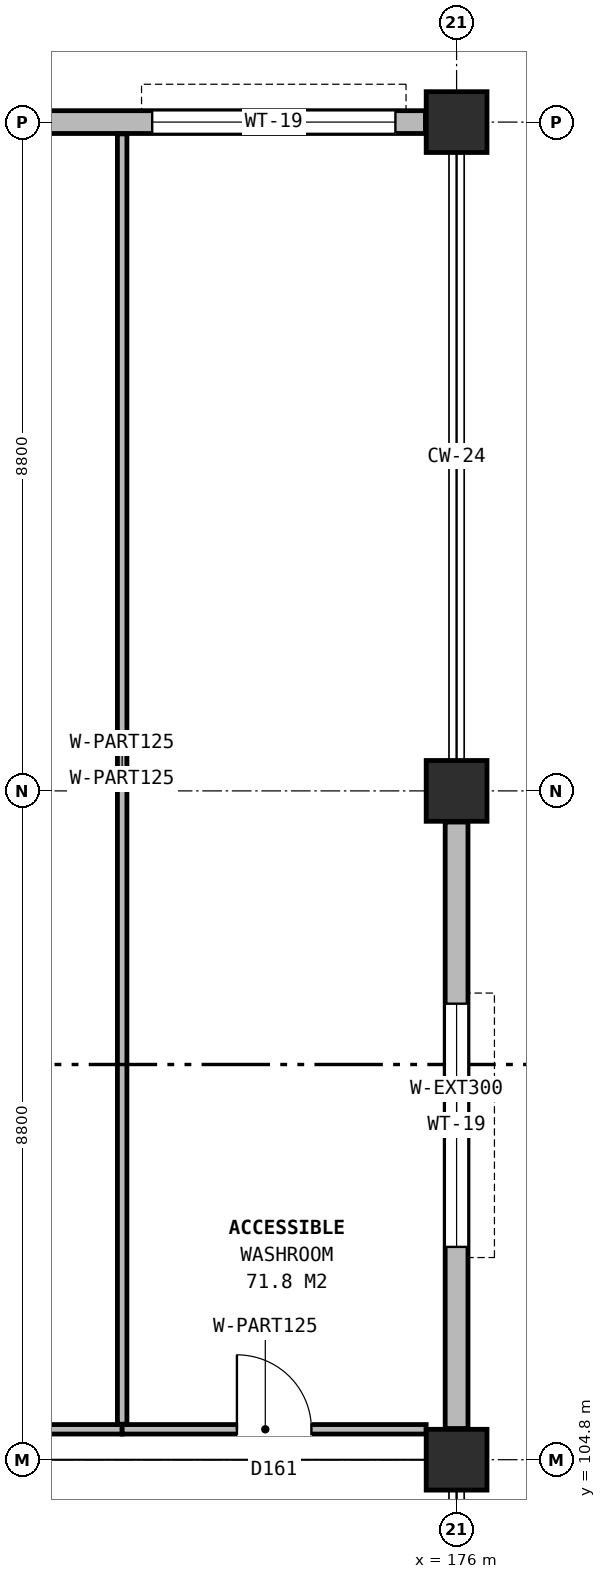
"""IFC4 building model, lengths in metres.
Left out: names, types, materials, properties, quantities, classifications, styles, units other than length and angle.
Written with IfcOpenShell. Run it as: python <this file> out.ifc"""

import sys

from ifc_helpers import new_model, si_unit, direction, frame, frame_2d, origin, origin_2d, place, context, subcontext, project, spatial, rectangle, extrude, element, fill, save


model = new_model("IFC4")
c1 = context("Model", 3, precision=1e-05, world=origin(), true_north=direction((0.0, 1.0)))
c2 = subcontext(c1, "Body", "Model", "MODEL_VIEW")
j1 = project(units=[si_unit("LENGTHUNIT", "METRE"), si_unit("PLANEANGLEUNIT", "RADIAN")], contexts=[c1])
p1 = place(None, origin())
s1 = spatial("IfcSite", under=j1, at=p1, CompositionType="ELEMENT")
p2 = place(p1, origin())
s2 = spatial("IfcBuilding", under=s1, at=p2, CompositionType="ELEMENT")
p3 = place(p2, frame((0.0, 0.0, 4.8)))
s3 = spatial("IfcBuildingStorey", under=s2, at=p3, CompositionType="ELEMENT", Elevation=4.8)
for number, where, z_axis, x_axis in (
    (1, (176.0, 104.8, 0.0), (0.0, 0.0, 1.0), (1.0, 0.0, 0.0)),
    (2, (176.0, 113.6, 0.0), (0.0, 0.0, 1.0), (1.0, 0.0, 0.0)),
    (3, (176.0, 122.4, 0.0), (0.0, 0.0, 1.0), (1.0, 0.0, 0.0)),
):
    element("IfcColumn", number, at=place(p3, frame(where, z_axis=z_axis, x_axis=x_axis)), inside=s3, PredefinedType="COLUMN", context=c2, shape_type="SweptSolid", body=[
        extrude(rectangle(XDim=0.8, YDim=0.8, at=origin_2d()), origin(), (0.0, 0.0, 1.0), 4.2),
    ])
p4 = place(p3, frame((176.0, 105.21, 0.0), z_axis=(0.0, 0.0, 1.0), x_axis=(0.0, 1.0, 0.0)))
e4 = element("IfcWall", 4, at=p4, inside=s3, PredefinedType="SOLIDWALL", context=c2, shape_type="SweptSolid", body=[
    extrude(rectangle(XDim=7.98, YDim=0.3, at=frame_2d((3.99, 0.0))), origin(), (0.0, 0.0, 1.0), 3.45),
])
p5 = place(p4, frame((2.39, 0.0, 0.9)))
e5 = element("IfcOpeningElement", 5, at=p5, cuts=e4, PredefinedType="OPENING", context=c2, shape_type="SweptSolid", body=[
    extrude(rectangle(XDim=3.2, YDim=2.1, at=frame_2d((1.6, 1.05))), frame((0.0, 0.16, 0.0), z_axis=(0.0, -1.0, 0.0), x_axis=(1.0, 0.0, 0.0)), (0.0, 0.0, 1.0), 0.32),
])
p6 = place(p3, frame((175.59, 122.4, 0.0), z_axis=(0.0, 0.0, 1.0), x_axis=(-1.0, 0.0, 0.0)))
e6 = element("IfcWall", 6, at=p6, inside=s3, PredefinedType="SOLIDWALL", context=c2, shape_type="SweptSolid", body=[
    extrude(rectangle(XDim=7.58, YDim=0.3, at=frame_2d((3.79, 0.0))), origin(), (0.0, 0.0, 1.0), 3.45),
])
p7 = place(p6, frame((0.395, 0.0, 0.9)))
e7 = element("IfcOpeningElement", 7, at=p7, cuts=e6, PredefinedType="OPENING", context=c2, shape_type="SweptSolid", body=[
    extrude(rectangle(XDim=3.2, YDim=2.1, at=frame_2d((1.6, 1.05))), frame((0.0, 0.16, 0.0), z_axis=(0.0, -1.0, 0.0), x_axis=(1.0, 0.0, 0.0)), (0.0, 0.0, 1.0), 0.32),
])
p8 = place(p3, frame((167.355, 105.2, 0.0), z_axis=(0.0, 0.0, 1.0), x_axis=(1.0, 0.0, 0.0)))
e8 = element("IfcWall", 8, at=p8, inside=s3, PredefinedType="PARTITIONING", context=c2, shape_type="SweptSolid", body=[
    extrude(rectangle(XDim=4.245, YDim=0.125, at=frame_2d((2.123, 0.0))), origin(), (0.0, 0.0, 1.0), 3.445),
])
p9 = place(p8, frame((1.633, 0.0, 0.0)))
e9 = element("IfcOpeningElement", 9, at=p9, cuts=e8, PredefinedType="OPENING", context=c2, shape_type="SweptSolid", body=[
    extrude(rectangle(XDim=0.98, YDim=2.1, at=frame_2d((0.49, 1.05))), frame((0.0, 0.073, 0.0), z_axis=(0.0, -1.0, 0.0), x_axis=(1.0, 0.0, 0.0)), (0.0, 0.0, 1.0), 0.145),
])
p10 = place(p3, frame((171.6, 105.2, 0.0), z_axis=(0.0, 0.0, 1.0), x_axis=(1.0, 0.0, 0.0)))
e10 = element("IfcWall", 10, at=p10, inside=s3, PredefinedType="PARTITIONING", context=c2, shape_type="SweptSolid", body=[
    extrude(rectangle(XDim=4.0, YDim=0.125, at=frame_2d((2.0, 0.0))), origin(), (0.0, 0.0, 1.0), 3.445),
])
p11 = place(p10, frame((1.51, 0.0, 0.0)))
e11 = element("IfcOpeningElement", 11, at=p11, cuts=e10, PredefinedType="OPENING", context=c2, shape_type="SweptSolid", body=[
    extrude(rectangle(XDim=0.98, YDim=2.1, at=frame_2d((0.49, 1.05))), frame((0.0, 0.073, 0.0), z_axis=(0.0, -1.0, 0.0), x_axis=(1.0, 0.0, 0.0)), (0.0, 0.0, 1.0), 0.145),
])
p12 = place(p3, frame((171.6, 105.268, 0.0), z_axis=(0.0, 0.0, 1.0), x_axis=(0.0, 1.0, 0.0)))
e12 = element("IfcWall", 12, at=p12, inside=s3, PredefinedType="PARTITIONING", context=c2, shape_type="SweptSolid", body=[
    extrude(rectangle(XDim=16.978, YDim=0.125, at=frame_2d((8.489, 0.0))), origin(), (0.0, 0.0, 1.0), 3.865),
])
p13 = place(p5, origin())
e13 = element("IfcWindow", 13, at=p13, inside=s3, PartitioningType="SINGLE_PANEL", PredefinedType="WINDOW", context=c2, shape_type="SweptSolid", body=[
    extrude(rectangle(XDim=3.2, YDim=2.1, at=frame_2d((1.6, 1.05))), frame((0.0, 0.03, 0.0), z_axis=(0.0, -1.0, 0.0), x_axis=(1.0, 0.0, 0.0)), (0.0, 0.0, 1.0), 0.06),
])
fill(e5, e13)
p14 = place(p7, origin())
e14 = element("IfcWindow", 14, at=p14, inside=s3, PartitioningType="SINGLE_PANEL", PredefinedType="WINDOW", context=c2, shape_type="SweptSolid", body=[
    extrude(rectangle(XDim=3.2, YDim=2.1, at=frame_2d((1.6, 1.05))), frame((0.0, 0.03, 0.0), z_axis=(0.0, -1.0, 0.0), x_axis=(1.0, 0.0, 0.0)), (0.0, 0.0, 1.0), 0.06),
])
fill(e7, e14)
p15 = place(p11, origin())
e15 = element("IfcDoor", 15, at=p15, inside=s3, OperationType="SINGLE_SWING_LEFT", PredefinedType="DOOR", context=c2, shape_type="SweptSolid", body=[
    extrude(rectangle(XDim=0.98, YDim=2.1, at=frame_2d((0.49, 1.05))), frame((0.0, 0.025, 0.0), z_axis=(0.0, -1.0, 0.0), x_axis=(1.0, 0.0, 0.0)), (0.0, 0.0, 1.0), 0.05),
])
fill(e11, e15)
save(model, sys.argv[1])
